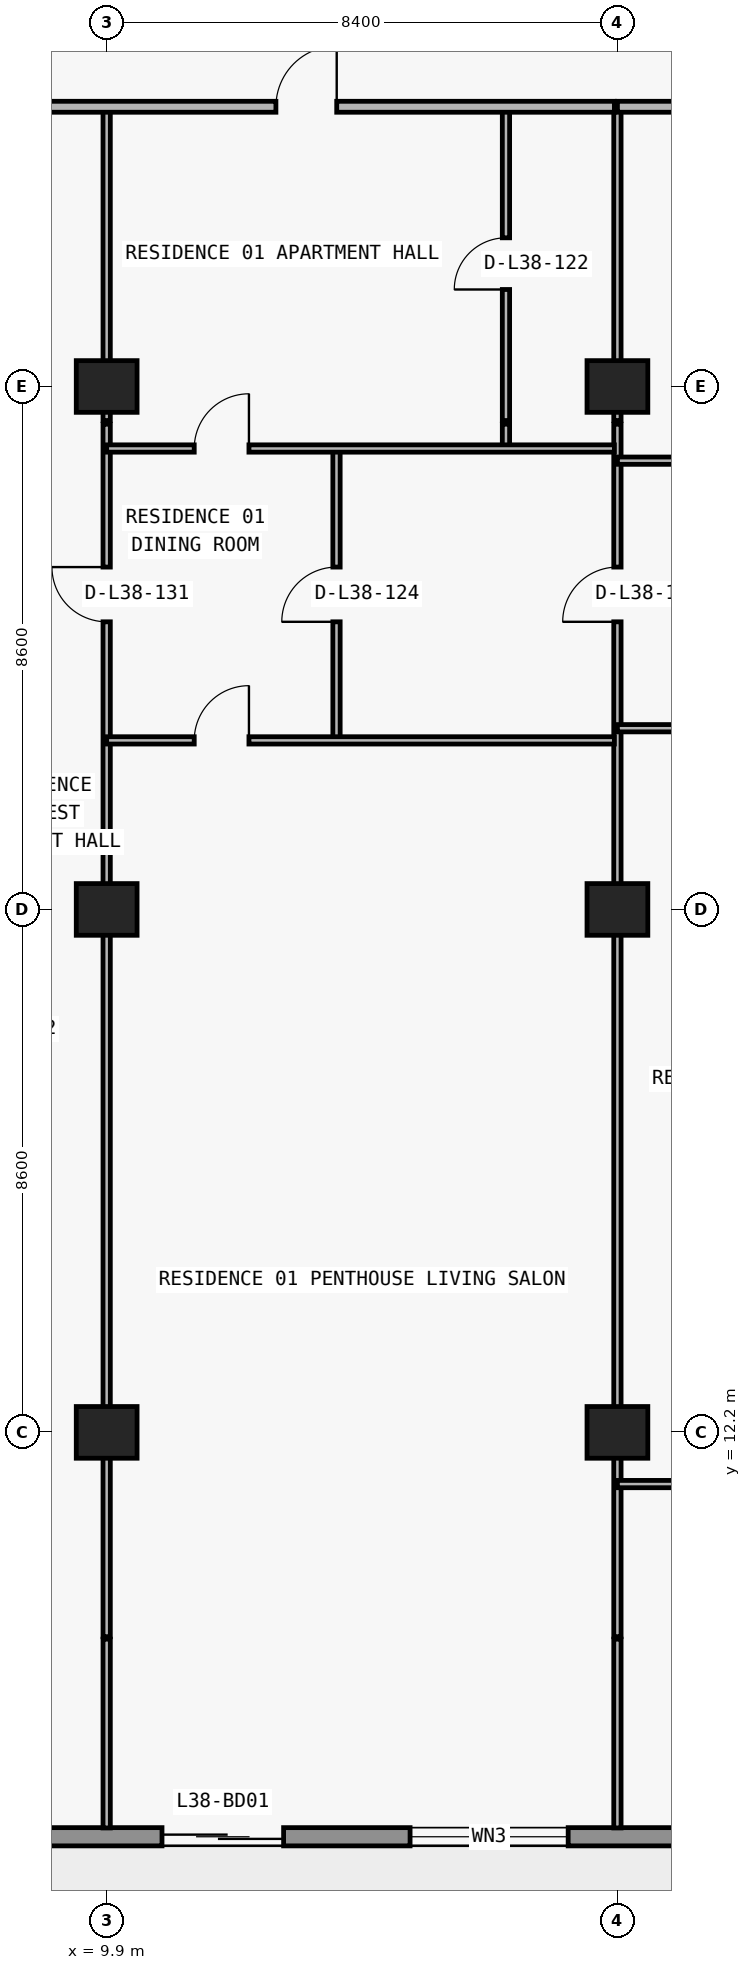
"""IFC4 building model, lengths in metres.
Left out: names, types, materials, properties, quantities, classifications, styles, units other than length and angle.
Written with IfcOpenShell. Run it as: python <this file> out.ifc"""

import sys

from ifc_helpers import new_model, si_unit, direction, frame, frame_2d, origin, origin_2d, place, context, subcontext, project, spatial, rectangle, extrude, element, fill, save


model = new_model("IFC4")
c1 = context("Model", 3, precision=1e-05, world=origin(), true_north=direction((0.0, 1.0)))
c2 = subcontext(c1, "Body", "Model", "MODEL_VIEW")
j1 = project(units=[si_unit("LENGTHUNIT", "METRE"), si_unit("PLANEANGLEUNIT", "RADIAN")], contexts=[c1])
p1 = place(None, origin())
s1 = spatial("IfcSite", under=j1, at=p1, CompositionType="ELEMENT")
p2 = place(p1, origin())
s2 = spatial("IfcBuilding", under=s1, at=p2, CompositionType="ELEMENT")
p3 = place(p2, frame((0.0, 0.0, 138.9)))
s3 = spatial("IfcBuildingStorey", under=s2, at=p3, CompositionType="ELEMENT", Elevation=138.9)
for number, where, z_axis, x_axis in (
    (1, (9.9, 12.2, 0.0), (0.0, 0.0, 1.0), (1.0, 0.0, 0.0)),
    (2, (18.3, 12.2, 0.0), (0.0, 0.0, 1.0), (1.0, 0.0, 0.0)),
    (3, (9.9, 20.8, 0.0), (0.0, 0.0, 1.0), (1.0, 0.0, 0.0)),
    (4, (18.3, 20.8, 0.0), (0.0, 0.0, 1.0), (1.0, 0.0, 0.0)),
    (5, (9.9, 29.4, 0.0), (0.0, 0.0, 1.0), (1.0, 0.0, 0.0)),
    (6, (18.3, 29.4, 0.0), (0.0, 0.0, 1.0), (1.0, 0.0, 0.0)),
):
    element("IfcColumn", number, at=place(p3, frame(where, z_axis=z_axis, x_axis=x_axis)), inside=s3, PredefinedType="COLUMN", context=c2, shape_type="SweptSolid", body=[
        extrude(rectangle(XDim=1.0, YDim=0.85, at=origin_2d()), origin(), (0.0, 0.0, 1.0), 3.05),
    ])
p4 = place(p3, frame((70.1, 5.55, 0.0), z_axis=(0.0, 0.0, 1.0), x_axis=(-1.0, 0.0, 0.0)))
e7 = element("IfcWall", 7, at=p4, inside=s3, PredefinedType="STANDARD", context=c2, shape_type="SweptSolid", body=[
    extrude(rectangle(XDim=62.4, YDim=0.3, at=frame_2d((31.2, 0.0))), origin(), (0.0, 0.0, 1.0), 3.05),
])
p5 = place(p4, frame((57.29, 0.0, 0.0)))
e8 = element("IfcOpeningElement", 8, at=p5, cuts=e7, PredefinedType="OPENING", context=c2, shape_type="SweptSolid", body=[
    extrude(rectangle(XDim=2.0, YDim=2.3, at=frame_2d((1.0, 1.15))), frame((0.0, 0.16, 0.0), z_axis=(0.0, -1.0, 0.0), x_axis=(1.0, 0.0, 0.0)), (0.0, 0.0, 1.0), 0.32),
])
p6 = place(p4, frame((52.61, 0.0, 0.65)))
e9 = element("IfcOpeningElement", 9, at=p6, cuts=e7, PredefinedType="OPENING", context=c2, shape_type="SweptSolid", body=[
    extrude(rectangle(XDim=2.6, YDim=1.85, at=frame_2d((1.3, 0.925))), frame((0.0, 0.16, 0.0), z_axis=(0.0, -1.0, 0.0), x_axis=(1.0, 0.0, 0.0)), (0.0, 0.0, 1.0), 0.32),
])
p7 = place(p4, frame((46.5, 0.0, 0.85)))
e10 = element("IfcOpeningElement", 10, at=p7, cuts=e7, PredefinedType="OPENING", context=c2, shape_type="SweptSolid", body=[
    extrude(rectangle(XDim=2.2, YDim=1.55, at=frame_2d((1.1, 0.775))), frame((0.0, 0.16, 0.0), z_axis=(0.0, -1.0, 0.0), x_axis=(1.0, 0.0, 0.0)), (0.0, 0.0, 1.0), 0.32),
])
p8 = place(p4, frame((40.49, 0.0, 0.0)))
e11 = element("IfcOpeningElement", 11, at=p8, cuts=e7, PredefinedType="OPENING", context=c2, shape_type="SweptSolid", body=[
    extrude(rectangle(XDim=2.0, YDim=2.3, at=frame_2d((1.0, 1.15))), frame((0.0, 0.16, 0.0), z_axis=(0.0, -1.0, 0.0), x_axis=(1.0, 0.0, 0.0)), (0.0, 0.0, 1.0), 0.32),
])
p9 = place(p4, frame((35.81, 0.0, 0.65)))
e12 = element("IfcOpeningElement", 12, at=p9, cuts=e7, PredefinedType="OPENING", context=c2, shape_type="SweptSolid", body=[
    extrude(rectangle(XDim=2.6, YDim=1.85, at=frame_2d((1.3, 0.925))), frame((0.0, 0.16, 0.0), z_axis=(0.0, -1.0, 0.0), x_axis=(1.0, 0.0, 0.0)), (0.0, 0.0, 1.0), 0.32),
])
p10 = place(p4, frame((30.1, 0.0, 0.85)))
e13 = element("IfcOpeningElement", 13, at=p10, cuts=e7, PredefinedType="OPENING", context=c2, shape_type="SweptSolid", body=[
    extrude(rectangle(XDim=2.2, YDim=1.55, at=frame_2d((1.1, 0.775))), frame((0.0, 0.16, 0.0), z_axis=(0.0, -1.0, 0.0), x_axis=(1.0, 0.0, 0.0)), (0.0, 0.0, 1.0), 0.32),
])
p11 = place(p4, frame((22.1, 0.0, 0.85)))
e14 = element("IfcOpeningElement", 14, at=p11, cuts=e7, PredefinedType="OPENING", context=c2, shape_type="SweptSolid", body=[
    extrude(rectangle(XDim=2.2, YDim=1.55, at=frame_2d((1.1, 0.775))), frame((0.0, 0.16, 0.0), z_axis=(0.0, -1.0, 0.0), x_axis=(1.0, 0.0, 0.0)), (0.0, 0.0, 1.0), 0.32),
])
p12 = place(p4, frame((16.026, 0.0, 0.0)))
e15 = element("IfcOpeningElement", 15, at=p12, cuts=e7, PredefinedType="OPENING", context=c2, shape_type="SweptSolid", body=[
    extrude(rectangle(XDim=2.0, YDim=2.3, at=frame_2d((1.0, 1.15))), frame((0.0, 0.16, 0.0), z_axis=(0.0, -1.0, 0.0), x_axis=(1.0, 0.0, 0.0)), (0.0, 0.0, 1.0), 0.32),
])
p13 = place(p4, frame((11.726, 0.0, 0.85)))
e16 = element("IfcOpeningElement", 16, at=p13, cuts=e7, PredefinedType="OPENING", context=c2, shape_type="SweptSolid", body=[
    extrude(rectangle(XDim=2.2, YDim=1.55, at=frame_2d((1.1, 0.775))), frame((0.0, 0.16, 0.0), z_axis=(0.0, -1.0, 0.0), x_axis=(1.0, 0.0, 0.0)), (0.0, 0.0, 1.0), 0.32),
])
p14 = place(p4, frame((7.29, 0.0, 0.0)))
e17 = element("IfcOpeningElement", 17, at=p14, cuts=e7, PredefinedType="OPENING", context=c2, shape_type="SweptSolid", body=[
    extrude(rectangle(XDim=2.0, YDim=2.3, at=frame_2d((1.0, 1.15))), frame((0.0, 0.16, 0.0), z_axis=(0.0, -1.0, 0.0), x_axis=(1.0, 0.0, 0.0)), (0.0, 0.0, 1.0), 0.32),
])
p15 = place(p4, frame((3.19, 0.0, 0.85)))
e18 = element("IfcOpeningElement", 18, at=p15, cuts=e7, PredefinedType="OPENING", context=c2, shape_type="SweptSolid", body=[
    extrude(rectangle(XDim=1.8, YDim=1.55, at=frame_2d((0.9, 0.775))), frame((0.0, 0.16, 0.0), z_axis=(0.0, -1.0, 0.0), x_axis=(1.0, 0.0, 0.0)), (0.0, 0.0, 1.0), 0.32),
])
p16 = place(p3, frame((9.9, 5.695, 0.0), z_axis=(0.0, 0.0, 1.0), x_axis=(0.0, 1.0, 0.0)))
e19 = element("IfcWall", 19, at=p16, inside=s3, PredefinedType="PARTITIONING", context=c2, shape_type="SweptSolid", body=[
    extrude(rectangle(XDim=3.105, YDim=0.12, at=frame_2d((1.552, 0.0))), origin(), (0.0, 0.0, 1.0), 3.05),
])
p17 = place(p3, frame((9.9, 8.84, 0.0), z_axis=(0.0, 0.0, 1.0), x_axis=(0.0, 1.0, 0.0)))
e20 = element("IfcWall", 20, at=p17, inside=s3, PredefinedType="PARTITIONING", context=c2, shape_type="SweptSolid", body=[
    extrude(rectangle(XDim=19.94, YDim=0.12, at=frame_2d((9.97, 0.0))), origin(), (0.0, 0.0, 1.0), 2.174),
])
p18 = place(p17, frame((16.69, 0.0, 0.0)))
e21 = element("IfcOpeningElement", 21, at=p18, cuts=e20, PredefinedType="OPENING", context=c2, shape_type="SweptSolid", body=[
    extrude(rectangle(XDim=0.9, YDim=2.124, at=frame_2d((0.45, 1.062))), frame((0.0, 0.07, 0.0), z_axis=(0.0, -1.0, 0.0), x_axis=(1.0, 0.0, 0.0)), (0.0, 0.0, 1.0), 0.14),
])
p19 = place(p3, frame((9.9, 28.84, 0.0), z_axis=(0.0, 0.0, 1.0), x_axis=(0.0, 1.0, 0.0)))
e22 = element("IfcWall", 22, at=p19, inside=s3, PredefinedType="PARTITIONING", context=c2, shape_type="SweptSolid", body=[
    extrude(rectangle(XDim=5.16, YDim=0.12, at=frame_2d((2.58, 0.0))), origin(), (0.0, 0.0, 1.0), 2.174),
])
p20 = place(p3, frame((13.68, 23.58, 0.0), z_axis=(0.0, 0.0, 1.0), x_axis=(0.0, 1.0, 0.0)))
e23 = element("IfcWall", 23, at=p20, inside=s3, PredefinedType="PARTITIONING", context=c2, shape_type="SweptSolid", body=[
    extrude(rectangle(XDim=4.8, YDim=0.12, at=frame_2d((2.4, 0.0))), origin(), (0.0, 0.0, 1.0), 3.05),
])
p21 = place(p20, frame((1.95, 0.0, 0.0)))
e24 = element("IfcOpeningElement", 24, at=p21, cuts=e23, PredefinedType="OPENING", context=c2, shape_type="SweptSolid", body=[
    extrude(rectangle(XDim=0.9, YDim=2.15, at=frame_2d((0.45, 1.075))), frame((0.0, 0.07, 0.0), z_axis=(0.0, -1.0, 0.0), x_axis=(1.0, 0.0, 0.0)), (0.0, 0.0, 1.0), 0.14),
])
p22 = place(p3, frame((16.467, 28.38, 0.0), z_axis=(0.0, 0.0, 1.0), x_axis=(0.0, 1.0, 0.0)))
e25 = element("IfcWall", 25, at=p22, inside=s3, PredefinedType="PARTITIONING", context=c2, shape_type="SweptSolid", body=[
    extrude(rectangle(XDim=0.4, YDim=0.12, at=frame_2d((0.2, 0.0))), origin(), (0.0, 0.0, 1.0), 3.05),
])
p23 = place(p3, frame((16.467, 28.84, 0.0), z_axis=(0.0, 0.0, 1.0), x_axis=(0.0, 1.0, 0.0)))
e26 = element("IfcWall", 26, at=p23, inside=s3, PredefinedType="PARTITIONING", context=c2, shape_type="SweptSolid", body=[
    extrude(rectangle(XDim=5.16, YDim=0.12, at=frame_2d((2.58, 0.0))), origin(), (0.0, 0.0, 1.0), 3.05),
])
p24 = place(p23, frame((2.155, 0.0, 0.0)))
e27 = element("IfcOpeningElement", 27, at=p24, cuts=e26, PredefinedType="OPENING", context=c2, shape_type="SweptSolid", body=[
    extrude(rectangle(XDim=0.85, YDim=2.1, at=frame_2d((0.425, 1.05))), frame((0.0, 0.07, 0.0), z_axis=(0.0, -1.0, 0.0), x_axis=(1.0, 0.0, 0.0)), (0.0, 0.0, 1.0), 0.14),
])
p25 = place(p3, frame((18.3, 5.695, 0.0), z_axis=(0.0, 0.0, 1.0), x_axis=(0.0, 1.0, 0.0)))
e28 = element("IfcWall", 28, at=p25, inside=s3, PredefinedType="PARTITIONING", context=c2, shape_type="SweptSolid", body=[
    extrude(rectangle(XDim=3.105, YDim=0.12, at=frame_2d((1.552, 0.0))), origin(), (0.0, 0.0, 1.0), 3.05),
])
p26 = place(p3, frame((18.3, 8.84, 0.0), z_axis=(0.0, 0.0, 1.0), x_axis=(0.0, 1.0, 0.0)))
e29 = element("IfcWall", 29, at=p26, inside=s3, PredefinedType="PARTITIONING", context=c2, shape_type="SweptSolid", body=[
    extrude(rectangle(XDim=19.94, YDim=0.12, at=frame_2d((9.97, 0.0))), origin(), (0.0, 0.0, 1.0), 2.174),
])
p27 = place(p26, frame((16.69, 0.0, 0.0)))
e30 = element("IfcOpeningElement", 30, at=p27, cuts=e29, PredefinedType="OPENING", context=c2, shape_type="SweptSolid", body=[
    extrude(rectangle(XDim=0.9, YDim=2.124, at=frame_2d((0.45, 1.062))), frame((0.0, 0.07, 0.0), z_axis=(0.0, -1.0, 0.0), x_axis=(1.0, 0.0, 0.0)), (0.0, 0.0, 1.0), 0.14),
])
p28 = place(p3, frame((18.3, 28.84, 0.0), z_axis=(0.0, 0.0, 1.0), x_axis=(0.0, 1.0, 0.0)))
e31 = element("IfcWall", 31, at=p28, inside=s3, PredefinedType="PARTITIONING", context=c2, shape_type="SweptSolid", body=[
    extrude(rectangle(XDim=5.16, YDim=0.12, at=frame_2d((2.58, 0.0))), origin(), (0.0, 0.0, 1.0), 2.174),
])
p29 = place(p3, frame((18.3, 11.35, 0.0), z_axis=(0.0, 0.0, 1.0), x_axis=(1.0, 0.0, 0.0)))
e32 = element("IfcWall", 32, at=p29, inside=s3, PredefinedType="PARTITIONING", context=c2, shape_type="SweptSolid", body=[
    extrude(rectangle(XDim=8.4, YDim=0.12, at=frame_2d((4.2, 0.0))), origin(), (0.0, 0.0, 1.0), 3.05),
])
p30 = place(p29, frame((3.75, 0.0, 0.0)))
e33 = element("IfcOpeningElement", 33, at=p30, cuts=e32, PredefinedType="OPENING", context=c2, shape_type="SweptSolid", body=[
    extrude(rectangle(XDim=0.9, YDim=2.15, at=frame_2d((0.45, 1.075))), frame((0.0, 0.07, 0.0), z_axis=(0.0, -1.0, 0.0), x_axis=(1.0, 0.0, 0.0)), (0.0, 0.0, 1.0), 0.14),
])
p31 = place(p3, frame((9.9, 23.58, 0.0), z_axis=(0.0, 0.0, 1.0), x_axis=(1.0, 0.0, 0.0)))
e34 = element("IfcWall", 34, at=p31, inside=s3, PredefinedType="PARTITIONING", context=c2, shape_type="SweptSolid", body=[
    extrude(rectangle(XDim=8.35, YDim=0.12, at=frame_2d((4.175, 0.0))), origin(), (0.0, 0.0, 1.0), 3.05),
])
p32 = place(p31, frame((1.44, 0.0, 0.0)))
e35 = element("IfcOpeningElement", 35, at=p32, cuts=e34, PredefinedType="OPENING", context=c2, shape_type="SweptSolid", body=[
    extrude(rectangle(XDim=0.9, YDim=2.15, at=frame_2d((0.45, 1.075))), frame((0.0, 0.07, 0.0), z_axis=(0.0, -1.0, 0.0), x_axis=(1.0, 0.0, 0.0)), (0.0, 0.0, 1.0), 0.14),
])
p33 = place(p3, frame((18.3, 23.78, 0.0), z_axis=(0.0, 0.0, 1.0), x_axis=(1.0, 0.0, 0.0)))
e36 = element("IfcWall", 36, at=p33, inside=s3, PredefinedType="PARTITIONING", context=c2, shape_type="SweptSolid", body=[
    extrude(rectangle(XDim=8.18, YDim=0.12, at=frame_2d((4.09, 0.0))), origin(), (0.0, 0.0, 1.0), 3.05),
])
p34 = place(p33, frame((3.64, 0.0, 0.0)))
e37 = element("IfcOpeningElement", 37, at=p34, cuts=e36, PredefinedType="OPENING", context=c2, shape_type="SweptSolid", body=[
    extrude(rectangle(XDim=0.9, YDim=2.15, at=frame_2d((0.45, 1.075))), frame((0.0, 0.07, 0.0), z_axis=(0.0, -1.0, 0.0), x_axis=(1.0, 0.0, 0.0)), (0.0, 0.0, 1.0), 0.14),
])
p35 = place(p3, frame((18.3, 28.18, 0.0), z_axis=(0.0, 0.0, 1.0), x_axis=(1.0, 0.0, 0.0)))
e38 = element("IfcWall", 38, at=p35, inside=s3, PredefinedType="PARTITIONING", context=c2, shape_type="SweptSolid", body=[
    extrude(rectangle(XDim=8.18, YDim=0.12, at=frame_2d((4.09, 0.0))), origin(), (0.0, 0.0, 1.0), 3.05),
])
p36 = place(p35, frame((2.926, 0.0, 0.0)))
e39 = element("IfcOpeningElement", 39, at=p36, cuts=e38, PredefinedType="OPENING", context=c2, shape_type="SweptSolid", body=[
    extrude(rectangle(XDim=0.9, YDim=2.15, at=frame_2d((0.45, 1.075))), frame((0.0, 0.07, 0.0), z_axis=(0.0, -1.0, 0.0), x_axis=(1.0, 0.0, 0.0)), (0.0, 0.0, 1.0), 0.14),
])
p37 = place(p3, frame((9.9, 28.38, 0.0), z_axis=(0.0, 0.0, 1.0), x_axis=(1.0, 0.0, 0.0)))
e40 = element("IfcWall", 40, at=p37, inside=s3, PredefinedType="PARTITIONING", context=c2, shape_type="SweptSolid", body=[
    extrude(rectangle(XDim=8.35, YDim=0.12, at=frame_2d((4.175, 0.0))), origin(), (0.0, 0.0, 1.0), 3.05),
])
p38 = place(p37, frame((1.44, 0.0, 0.0)))
e41 = element("IfcOpeningElement", 41, at=p38, cuts=e40, PredefinedType="OPENING", context=c2, shape_type="SweptSolid", body=[
    extrude(rectangle(XDim=0.9, YDim=2.15, at=frame_2d((0.45, 1.075))), frame((0.0, 0.07, 0.0), z_axis=(0.0, -1.0, 0.0), x_axis=(1.0, 0.0, 0.0)), (0.0, 0.0, 1.0), 0.14),
])
p39 = place(p3, frame((7.705, 34.0, 0.0), z_axis=(0.0, 0.0, 1.0), x_axis=(1.0, 0.0, 0.0)))
e42 = element("IfcWall", 42, at=p39, inside=s3, PredefinedType="PARTITIONING", context=c2, shape_type="SweptSolid", body=[
    extrude(rectangle(XDim=10.545, YDim=0.18, at=frame_2d((5.272, 0.0))), origin(), (0.0, 0.0, 1.0), 3.05),
])
p40 = place(p39, frame((4.979, 0.0, 0.0)))
e43 = element("IfcOpeningElement", 43, at=p40, cuts=e42, PredefinedType="OPENING", context=c2, shape_type="SweptSolid", body=[
    extrude(rectangle(XDim=1.0, YDim=2.2, at=frame_2d((0.5, 1.1))), frame((0.0, 0.1, 0.0), z_axis=(0.0, -1.0, 0.0), x_axis=(1.0, 0.0, 0.0)), (0.0, 0.0, 1.0), 0.2),
])
p41 = place(p3, frame((18.3, 34.0, 0.0), z_axis=(0.0, 0.0, 1.0), x_axis=(1.0, 0.0, 0.0)))
e44 = element("IfcWall", 44, at=p41, inside=s3, PredefinedType="PARTITIONING", context=c2, shape_type="SweptSolid", body=[
    extrude(rectangle(XDim=37.586, YDim=0.18, at=frame_2d((18.793, 0.0))), origin(), (0.0, 0.0, 1.0), 3.05),
])
p42 = place(p41, frame((11.162, 0.0, 0.0)))
e45 = element("IfcOpeningElement", 45, at=p42, cuts=e44, PredefinedType="OPENING", context=c2, shape_type="SweptSolid", body=[
    extrude(rectangle(XDim=1.0, YDim=2.2, at=frame_2d((0.5, 1.1))), frame((0.0, 0.1, 0.0), z_axis=(0.0, -1.0, 0.0), x_axis=(1.0, 0.0, 0.0)), (0.0, 0.0, 1.0), 0.2),
])
p43 = place(p41, frame((34.693, 0.0, 0.0)))
e46 = element("IfcOpeningElement", 46, at=p43, cuts=e44, PredefinedType="OPENING", context=c2, shape_type="SweptSolid", body=[
    extrude(rectangle(XDim=1.0, YDim=2.2, at=frame_2d((0.5, 1.1))), frame((0.0, 0.1, 0.0), z_axis=(0.0, -1.0, 0.0), x_axis=(1.0, 0.0, 0.0)), (0.0, 0.0, 1.0), 0.2),
])
p44 = place(p5, origin())
e47 = element("IfcDoor", 47, at=p44, inside=s3, OperationType="DOUBLE_DOOR_SLIDING", PredefinedType="DOOR", context=c2, shape_type="SweptSolid", body=[
    extrude(rectangle(XDim=2.0, YDim=2.3, at=frame_2d((1.0, 1.15))), frame((0.0, 0.025, 0.0), z_axis=(0.0, -1.0, 0.0), x_axis=(1.0, 0.0, 0.0)), (0.0, 0.0, 1.0), 0.05),
])
fill(e8, e47)
p45 = place(p6, origin())
e48 = element("IfcWindow", 48, at=p45, inside=s3, PartitioningType="SINGLE_PANEL", PredefinedType="WINDOW", context=c2, shape_type="SweptSolid", body=[
    extrude(rectangle(XDim=2.6, YDim=1.85, at=frame_2d((1.3, 0.925))), frame((0.0, 0.03, 0.0), z_axis=(0.0, -1.0, 0.0), x_axis=(1.0, 0.0, 0.0)), (0.0, 0.0, 1.0), 0.06),
])
fill(e9, e48)
p46 = place(p40, origin())
e49 = element("IfcDoor", 49, at=p46, inside=s3, OperationType="SINGLE_SWING_RIGHT", PredefinedType="DOOR", context=c2, shape_type="SweptSolid", body=[
    extrude(rectangle(XDim=1.0, YDim=2.2, at=frame_2d((0.5, 1.1))), frame((0.0, 0.025, 0.0), z_axis=(0.0, -1.0, 0.0), x_axis=(1.0, 0.0, 0.0)), (0.0, 0.0, 1.0), 0.05),
])
fill(e43, e49)
p47 = place(p24, origin())
e50 = element("IfcDoor", 50, at=p47, inside=s3, OperationType="SINGLE_SWING_LEFT", PredefinedType="DOOR", context=c2, shape_type="SweptSolid", body=[
    extrude(rectangle(XDim=0.85, YDim=2.1, at=frame_2d((0.425, 1.05))), frame((0.0, 0.025, 0.0), z_axis=(0.0, -1.0, 0.0), x_axis=(1.0, 0.0, 0.0)), (0.0, 0.0, 1.0), 0.05),
])
fill(e27, e50)
p48 = place(p38, origin())
e51 = element("IfcDoor", 51, at=p48, inside=s3, OperationType="SINGLE_SWING_RIGHT", PredefinedType="DOOR", context=c2, shape_type="SweptSolid", body=[
    extrude(rectangle(XDim=0.9, YDim=2.15, at=frame_2d((0.45, 1.075))), frame((0.0, 0.025, 0.0), z_axis=(0.0, -1.0, 0.0), x_axis=(1.0, 0.0, 0.0)), (0.0, 0.0, 1.0), 0.05),
])
fill(e41, e51)
p49 = place(p21, origin())
e52 = element("IfcDoor", 52, at=p49, inside=s3, OperationType="SINGLE_SWING_LEFT", PredefinedType="DOOR", context=c2, shape_type="SweptSolid", body=[
    extrude(rectangle(XDim=0.9, YDim=2.15, at=frame_2d((0.45, 1.075))), frame((0.0, 0.025, 0.0), z_axis=(0.0, -1.0, 0.0), x_axis=(1.0, 0.0, 0.0)), (0.0, 0.0, 1.0), 0.05),
])
fill(e24, e52)
p50 = place(p32, origin())
e53 = element("IfcDoor", 53, at=p50, inside=s3, OperationType="SINGLE_SWING_RIGHT", PredefinedType="DOOR", context=c2, shape_type="SweptSolid", body=[
    extrude(rectangle(XDim=0.9, YDim=2.15, at=frame_2d((0.45, 1.075))), frame((0.0, 0.025, 0.0), z_axis=(0.0, -1.0, 0.0), x_axis=(1.0, 0.0, 0.0)), (0.0, 0.0, 1.0), 0.05),
])
fill(e35, e53)
p51 = place(p27, origin())
e54 = element("IfcDoor", 54, at=p51, inside=s3, OperationType="SINGLE_SWING_LEFT", PredefinedType="DOOR", context=c2, shape_type="SweptSolid", body=[
    extrude(rectangle(XDim=0.9, YDim=2.124, at=frame_2d((0.45, 1.062))), frame((0.0, 0.025, 0.0), z_axis=(0.0, -1.0, 0.0), x_axis=(1.0, 0.0, 0.0)), (0.0, 0.0, 1.0), 0.05),
])
fill(e30, e54)
p52 = place(p18, origin())
e55 = element("IfcDoor", 55, at=p52, inside=s3, OperationType="SINGLE_SWING_RIGHT", PredefinedType="DOOR", context=c2, shape_type="SweptSolid", body=[
    extrude(rectangle(XDim=0.9, YDim=2.124, at=frame_2d((0.45, 1.062))), frame((0.0, 0.025, 0.0), z_axis=(0.0, -1.0, 0.0), x_axis=(1.0, 0.0, 0.0)), (0.0, 0.0, 1.0), 0.05),
])
fill(e21, e55)
save(model, sys.argv[1])
